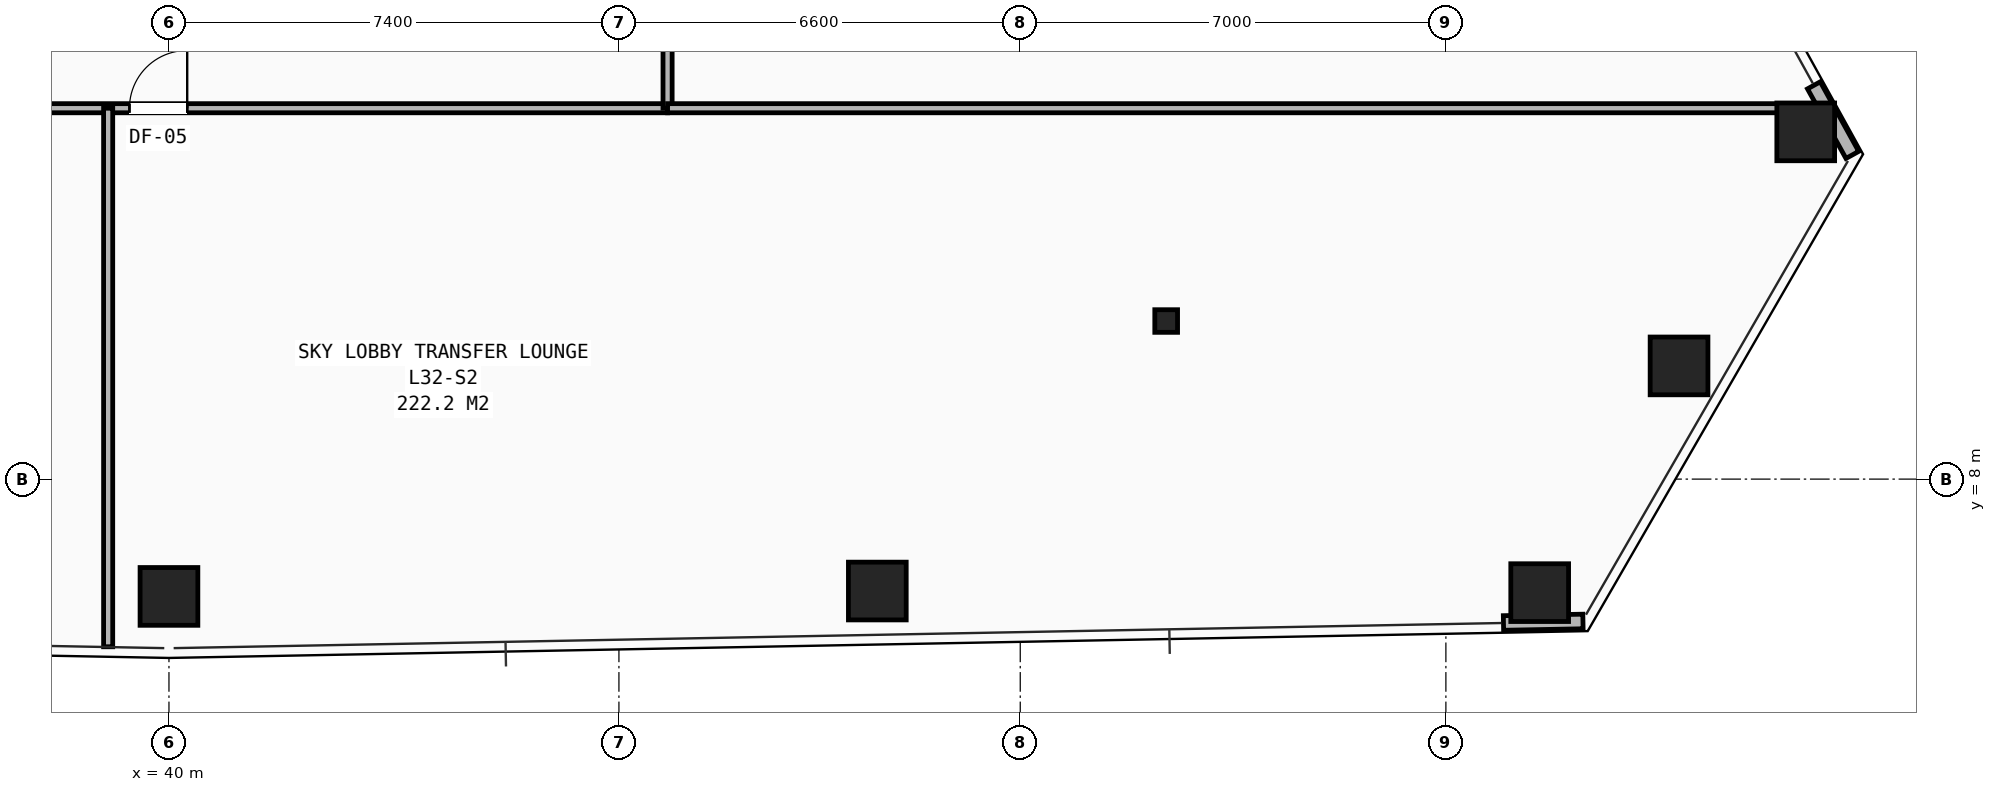
"""IFC4 building model, lengths in metres.
Left out: names, types, materials, properties, quantities, classifications, styles, units other than length and angle.
Written with IfcOpenShell. Run it as: python <this file> out.ifc"""

import sys

from ifc_helpers import new_model, si_unit, direction, frame, frame_2d, origin, origin_2d, place, context, subcontext, project, spatial, rectangle, hollow_rectangle, i_section, extrude, element, fill, save


model = new_model("IFC4")
c1 = context("Model", 3, precision=1e-05, world=origin(), true_north=direction((0.0, 1.0)))
c2 = subcontext(c1, "Body", "Model", "MODEL_VIEW")
j1 = project(units=[si_unit("LENGTHUNIT", "METRE"), si_unit("PLANEANGLEUNIT", "RADIAN")], contexts=[c1])
p1 = place(None, origin())
s1 = spatial("IfcSite", under=j1, at=p1, CompositionType="ELEMENT")
p2 = place(p1, origin())
s2 = spatial("IfcBuilding", under=s1, at=p2, CompositionType="ELEMENT")
p3 = place(p2, frame((0.0, 0.0, 111.8)))
s3 = spatial("IfcBuildingStorey", under=s2, at=p3, CompositionType="ELEMENT", Elevation=111.8)
p4 = place(p3, frame((56.4, 10.6, 0.0), z_axis=(0.0, 0.0, 1.0), x_axis=(1.0, 0.0, 0.0)))
e1 = element("IfcColumn", 1, at=p4, inside=s3, PredefinedType="COLUMN", context=c2, shape_type="SweptSolid", body=[
    extrude(i_section(OverallWidth=0.374, OverallDepth=0.372, WebThickness=0.016, FlangeThickness=0.026, at=origin_2d()), origin(), (0.0, 0.0, 1.0), 4.2),
])
for number, where, z_axis, x_axis in (
    (2, (40.0, 6.071, 0.0), (0.0, 0.0, 1.0), (1.0, 0.0, 0.0)),
    (3, (51.649, 6.159, 0.0), (0.0, 0.0, 1.0), (1.0, 0.0, 0.0)),
    (4, (62.542, 6.133, 0.0), (0.0, 0.0, 1.0), (1.0, 0.0, 0.0)),
    (5, (64.834, 9.862, 0.0), (0.0, 0.0, 1.0), (1.0, 0.0, 0.0)),
    (6, (66.918, 13.711, 0.0), (0.0, 0.0, 1.0), (1.0, 0.0, 0.0)),
):
    element("IfcColumn", number, at=place(p3, frame(where, z_axis=z_axis, x_axis=x_axis)), inside=s3, PredefinedType="COLUMN", context=c2, shape_type="SweptSolid", body=[
        extrude(hollow_rectangle(XDim=0.95, YDim=0.95, WallThickness=0.065, at=origin_2d()), origin(), (0.0, 0.0, 1.0), 4.2),
    ])
for number, where, z_axis, x_axis in (
    (7, (61.947, 5.634, 0.0), (0.0, 0.0, 1.0), (1.0, 0.019, 0.0)),
    (8, (67.685, 13.332, 0.0), (0.0, 0.0, 1.0), (-0.484, 0.875, 0.0)),
):
    element("IfcWall", number, at=place(p3, frame(where, z_axis=z_axis, x_axis=x_axis)), inside=s3, PredefinedType="SHEAR", context=c2, shape_type="SweptSolid", body=[
        extrude(rectangle(XDim=1.308, YDim=0.24, at=frame_2d((0.654, 0.0))), origin(), (0.0, 0.0, 1.0), 3.243),
    ])
p5 = place(p3, frame((29.6, 14.1, 0.0), z_axis=(0.0, 0.0, 1.0), x_axis=(1.0, 0.0, 0.0)))
e9 = element("IfcWall", 9, at=p5, inside=s3, PredefinedType="PARTITIONING", context=c2, shape_type="SweptSolid", body=[
    extrude(rectangle(XDim=18.6, YDim=0.15, at=frame_2d((9.3, 0.0))), origin(), (0.0, 0.0, 1.0), 2.975),
])
p6 = place(p5, frame((0.55, 0.0, 0.0)))
e10 = element("IfcOpeningElement", 10, at=p6, cuts=e9, PredefinedType="OPENING", context=c2, shape_type="SweptSolid", body=[
    extrude(rectangle(XDim=0.95, YDim=2.1, at=frame_2d((0.475, 1.05))), frame((0.0, 0.085, 0.0), z_axis=(0.0, -1.0, 0.0), x_axis=(1.0, 0.0, 0.0)), (0.0, 0.0, 1.0), 0.17),
])
p7 = place(p5, frame((9.75, 0.0, 0.0)))
e11 = element("IfcOpeningElement", 11, at=p7, cuts=e9, PredefinedType="OPENING", context=c2, shape_type="SweptSolid", body=[
    extrude(rectangle(XDim=0.95, YDim=2.1, at=frame_2d((0.475, 1.05))), frame((0.0, 0.085, 0.0), z_axis=(0.0, -1.0, 0.0), x_axis=(1.0, 0.0, 0.0)), (0.0, 0.0, 1.0), 0.17),
])
p8 = place(p3, frame((48.2, 14.1, 0.0), z_axis=(0.0, 0.0, 1.0), x_axis=(0.0, 1.0, 0.0)))
e12 = element("IfcWall", 12, at=p8, inside=s3, PredefinedType="PARTITIONING", context=c2, shape_type="SweptSolid", body=[
    extrude(rectangle(XDim=2.3, YDim=0.15, at=frame_2d((1.15, 0.0))), origin(), (0.0, 0.0, 1.0), 3.411),
])
p9 = place(p3, frame((39.0, 5.243, 0.0), z_axis=(0.0, 0.0, 1.0), x_axis=(0.0, 1.0, 0.0)))
e13 = element("IfcWall", 13, at=p9, inside=s3, PredefinedType="PARTITIONING", context=c2, shape_type="SweptSolid", body=[
    extrude(rectangle(XDim=8.857, YDim=0.15, at=frame_2d((4.429, 0.0))), origin(), (0.0, 0.0, 1.0), 2.975),
])
p10 = place(p3, frame((48.2, 14.1, 0.0), z_axis=(0.0, 0.0, 1.0), x_axis=(1.0, 0.0, 0.0)))
e14 = element("IfcWall", 14, at=p10, inside=s3, PredefinedType="PARTITIONING", context=c2, shape_type="SweptSolid", body=[
    extrude(rectangle(XDim=19.054, YDim=0.15, at=frame_2d((9.527, 0.0))), origin(), (0.0, 0.0, 1.0), 2.975),
])
p11 = place(p7, origin())
e15 = element("IfcDoor", 15, at=p11, inside=s3, OperationType="SINGLE_SWING_RIGHT", PredefinedType="DOOR", context=c2, shape_type="SweptSolid", body=[
    extrude(rectangle(XDim=0.95, YDim=2.1, at=frame_2d((0.475, 1.05))), frame((0.0, 0.025, 0.0), z_axis=(0.0, -1.0, 0.0), x_axis=(1.0, 0.0, 0.0)), (0.0, 0.0, 1.0), 0.05),
])
fill(e11, e15)
save(model, sys.argv[1])
